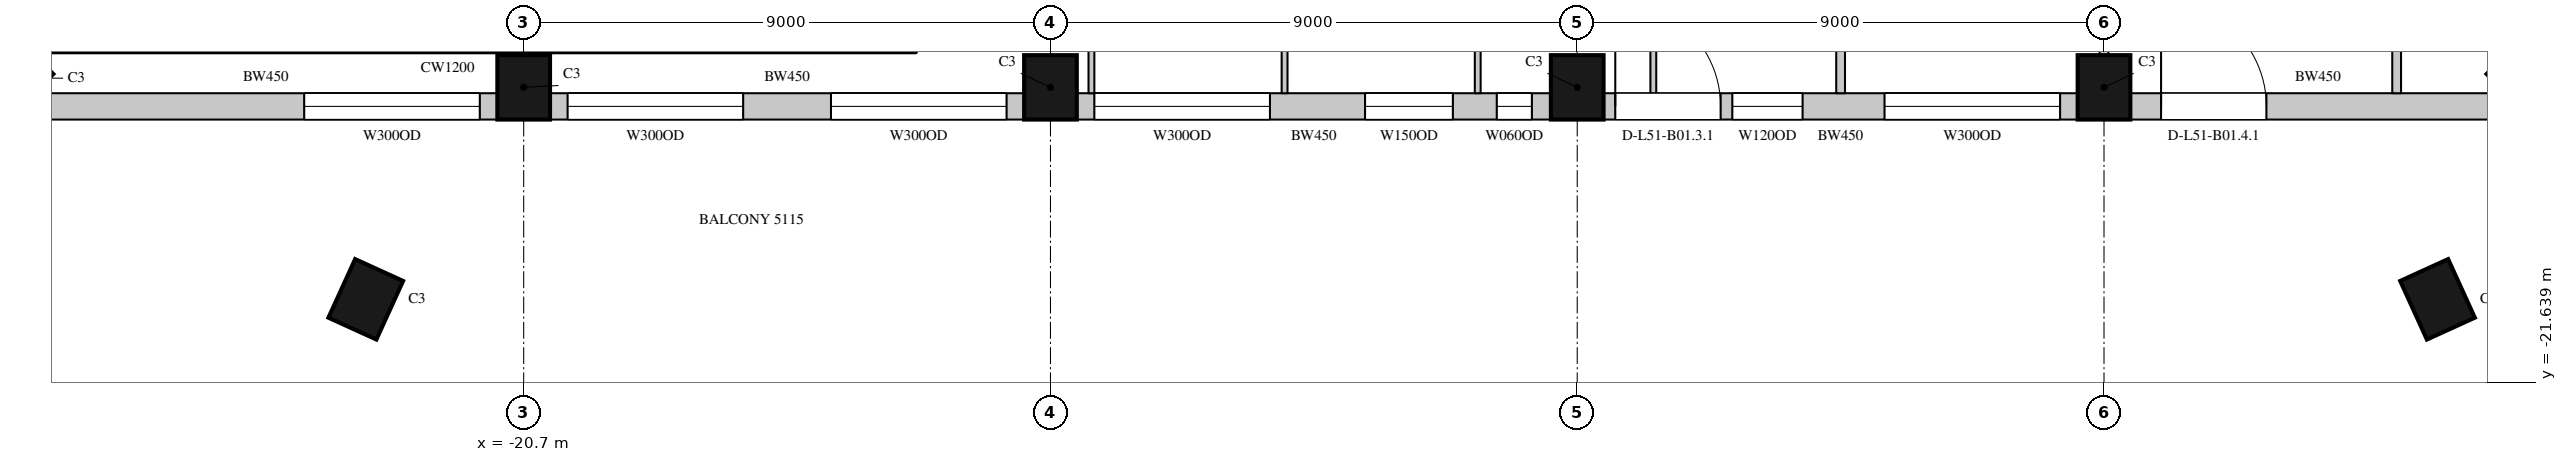
"""IFC4 building model, lengths in metres.
Left out: names, types, materials, properties, quantities, classifications, styles, units other than length and angle.
Written with IfcOpenShell. Run it as: python <this file> out.ifc"""

import sys

from ifc_helpers import new_model, si_unit, direction, frame, frame_2d, origin, origin_2d, place, context, subcontext, project, spatial, rectangle, extrude, element, fill, save


model = new_model("IFC4")
c1 = context("Model", 3, precision=1e-05, world=origin(), true_north=direction((0.0, 1.0)))
c2 = subcontext(c1, "Body", "Model", "MODEL_VIEW")
j1 = project(units=[si_unit("LENGTHUNIT", "METRE"), si_unit("PLANEANGLEUNIT", "RADIAN")], contexts=[c1])
p1 = place(None, origin())
s1 = spatial("IfcSite", under=j1, at=p1, CompositionType="ELEMENT")
p2 = place(p1, origin())
s2 = spatial("IfcBuilding", under=s1, at=p2, CompositionType="ELEMENT")
p3 = place(p2, frame((0.0, 0.0, 230.2)))
s3 = spatial("IfcBuildingStorey", under=s2, at=p3, CompositionType="ELEMENT", Elevation=230.2)
for number, where, z_axis, x_axis in (
    (1, (-29.443, -16.443, 0.0), (0.0, 0.0, 1.0), (0.707, -0.707, 0.0)),
    (2, (-20.7, -16.6, 0.0), (0.0, 0.0, 1.0), (1.0, 0.0, 0.0)),
    (3, (-11.7, -16.6, 0.0), (0.0, 0.0, 1.0), (1.0, 0.0, 0.0)),
    (4, (-2.7, -16.6, 0.0), (0.0, 0.0, 1.0), (1.0, 0.0, 0.0)),
    (5, (6.3, -16.6, 0.0), (0.0, 0.0, 1.0), (1.0, 0.0, 0.0)),
    (6, (13.543, -16.443, 0.0), (0.0, 0.0, 1.0), (0.707, 0.707, 0.0)),
    (7, (-23.398, -20.221, 0.0), (0.0, 0.0, 1.0), (0.91, -0.415, 0.0)),
    (8, (11.998, -20.221, 0.0), (0.0, 0.0, 1.0), (0.91, 0.415, 0.0)),
):
    element("IfcColumn", number, at=place(p3, frame(where, z_axis=z_axis, x_axis=x_axis)), inside=s3, PredefinedType="COLUMN", context=c2, shape_type="SweptSolid", body=[
        extrude(rectangle(XDim=0.9, YDim=1.1, at=origin_2d()), origin(), (0.0, 0.0, 1.0), 4.1),
    ])
p4 = place(p3, frame((-29.064, -16.925, 0.0), z_axis=(0.0, 0.0, 1.0), x_axis=(1.0, 0.0, 0.0)))
e9 = element("IfcWall", 9, at=p4, inside=s3, PredefinedType="SOLIDWALL", context=c2, shape_type="SweptSolid", body=[
    extrude(rectangle(XDim=7.914, YDim=0.45, at=frame_2d((3.957, 0.0))), origin(), (0.0, 0.0, 1.0), 3.8),
])
p5 = place(p4, frame((4.614, 0.0, 1.05)))
e10 = element("IfcOpeningElement", 10, at=p5, cuts=e9, PredefinedType="OPENING", context=c2, shape_type="SweptSolid", body=[
    extrude(rectangle(XDim=3.0, YDim=2.4, at=frame_2d((1.5, 1.2))), frame((0.0, 0.235, 0.0), z_axis=(0.0, -1.0, 0.0), x_axis=(1.0, 0.0, 0.0)), (0.0, 0.0, 1.0), 0.47),
])
p6 = place(p3, frame((-20.25, -16.925, 0.0), z_axis=(0.0, 0.0, 1.0), x_axis=(1.0, 0.0, 0.0)))
e11 = element("IfcWall", 11, at=p6, inside=s3, PredefinedType="SOLIDWALL", context=c2, shape_type="SweptSolid", body=[
    extrude(rectangle(XDim=8.1, YDim=0.45, at=frame_2d((4.05, 0.0))), origin(), (0.0, 0.0, 1.0), 3.8),
])
p7 = place(p6, frame((0.3, 0.0, 1.05)))
e12 = element("IfcOpeningElement", 12, at=p7, cuts=e11, PredefinedType="OPENING", context=c2, shape_type="SweptSolid", body=[
    extrude(rectangle(XDim=3.0, YDim=2.4, at=frame_2d((1.5, 1.2))), frame((0.0, 0.235, 0.0), z_axis=(0.0, -1.0, 0.0), x_axis=(1.0, 0.0, 0.0)), (0.0, 0.0, 1.0), 0.47),
])
p8 = place(p6, frame((4.8, 0.0, 1.05)))
e13 = element("IfcOpeningElement", 13, at=p8, cuts=e11, PredefinedType="OPENING", context=c2, shape_type="SweptSolid", body=[
    extrude(rectangle(XDim=3.0, YDim=2.4, at=frame_2d((1.5, 1.2))), frame((0.0, 0.235, 0.0), z_axis=(0.0, -1.0, 0.0), x_axis=(1.0, 0.0, 0.0)), (0.0, 0.0, 1.0), 0.47),
])
p9 = place(p3, frame((-11.25, -16.925, 0.0), z_axis=(0.0, 0.0, 1.0), x_axis=(1.0, 0.0, 0.0)))
e14 = element("IfcWall", 14, at=p9, inside=s3, PredefinedType="SOLIDWALL", context=c2, shape_type="SweptSolid", body=[
    extrude(rectangle(XDim=8.1, YDim=0.45, at=frame_2d((4.05, 0.0))), origin(), (0.0, 0.0, 1.0), 3.8),
])
p10 = place(p9, frame((0.3, 0.0, 1.05)))
e15 = element("IfcOpeningElement", 15, at=p10, cuts=e14, PredefinedType="OPENING", context=c2, shape_type="SweptSolid", body=[
    extrude(rectangle(XDim=3.0, YDim=2.4, at=frame_2d((1.5, 1.2))), frame((0.0, 0.235, 0.0), z_axis=(0.0, -1.0, 0.0), x_axis=(1.0, 0.0, 0.0)), (0.0, 0.0, 1.0), 0.47),
])
p11 = place(p9, frame((4.925, 0.0, 1.05)))
e16 = element("IfcOpeningElement", 16, at=p11, cuts=e14, PredefinedType="OPENING", context=c2, shape_type="SweptSolid", body=[
    extrude(rectangle(XDim=1.5, YDim=2.4, at=frame_2d((0.75, 1.2))), frame((0.0, 0.235, 0.0), z_axis=(0.0, -1.0, 0.0), x_axis=(1.0, 0.0, 0.0)), (0.0, 0.0, 1.0), 0.47),
])
p12 = place(p9, frame((7.175, 0.0, 1.05)))
e17 = element("IfcOpeningElement", 17, at=p12, cuts=e14, PredefinedType="OPENING", context=c2, shape_type="SweptSolid", body=[
    extrude(rectangle(XDim=0.6, YDim=2.4, at=frame_2d((0.3, 1.2))), frame((0.0, 0.235, 0.0), z_axis=(0.0, -1.0, 0.0), x_axis=(1.0, 0.0, 0.0)), (0.0, 0.0, 1.0), 0.47),
])
p13 = place(p3, frame((-2.25, -16.925, 0.0), z_axis=(0.0, 0.0, 1.0), x_axis=(1.0, 0.0, 0.0)))
e18 = element("IfcWall", 18, at=p13, inside=s3, PredefinedType="SOLIDWALL", context=c2, shape_type="SweptSolid", body=[
    extrude(rectangle(XDim=8.1, YDim=0.45, at=frame_2d((4.05, 0.0))), origin(), (0.0, 0.0, 1.0), 3.8),
])
p14 = place(p13, frame((0.2, 0.0, 0.0)))
e19 = element("IfcOpeningElement", 19, at=p14, cuts=e18, PredefinedType="OPENING", context=c2, shape_type="SweptSolid", body=[
    extrude(rectangle(XDim=1.8, YDim=2.4, at=frame_2d((0.9, 1.2))), frame((0.0, 0.235, 0.0), z_axis=(0.0, -1.0, 0.0), x_axis=(1.0, 0.0, 0.0)), (0.0, 0.0, 1.0), 0.47),
])
p15 = place(p13, frame((2.2, 0.0, 1.05)))
e20 = element("IfcOpeningElement", 20, at=p15, cuts=e18, PredefinedType="OPENING", context=c2, shape_type="SweptSolid", body=[
    extrude(rectangle(XDim=1.2, YDim=2.4, at=frame_2d((0.6, 1.2))), frame((0.0, 0.235, 0.0), z_axis=(0.0, -1.0, 0.0), x_axis=(1.0, 0.0, 0.0)), (0.0, 0.0, 1.0), 0.47),
])
p16 = place(p13, frame((4.8, 0.0, 1.05)))
e21 = element("IfcOpeningElement", 21, at=p16, cuts=e18, PredefinedType="OPENING", context=c2, shape_type="SweptSolid", body=[
    extrude(rectangle(XDim=3.0, YDim=2.4, at=frame_2d((1.5, 1.2))), frame((0.0, 0.235, 0.0), z_axis=(0.0, -1.0, 0.0), x_axis=(1.0, 0.0, 0.0)), (0.0, 0.0, 1.0), 0.47),
])
p17 = place(p3, frame((6.75, -16.925, 0.0), z_axis=(0.0, 0.0, 1.0), x_axis=(1.0, 0.0, 0.0)))
e22 = element("IfcWall", 22, at=p17, inside=s3, PredefinedType="SOLIDWALL", context=c2, shape_type="SweptSolid", body=[
    extrude(rectangle(XDim=6.414, YDim=0.45, at=frame_2d((3.207, 0.0))), origin(), (0.0, 0.0, 1.0), 3.8),
])
p18 = place(p17, frame((0.525, 0.0, 0.0)))
e23 = element("IfcOpeningElement", 23, at=p18, cuts=e22, PredefinedType="OPENING", context=c2, shape_type="SweptSolid", body=[
    extrude(rectangle(XDim=1.8, YDim=2.4, at=frame_2d((0.9, 1.2))), frame((0.0, 0.235, 0.0), z_axis=(0.0, -1.0, 0.0), x_axis=(1.0, 0.0, 0.0)), (0.0, 0.0, 1.0), 0.47),
])
for number, where, z_axis, x_axis in (
    (24, (-23.69, -18.0, 0.0), (0.0, 0.0, 1.0), (1.0, 0.0, 0.0)),
    (25, (-19.73, -18.0, 0.0), (0.0, 0.0, 1.0), (1.0, 0.0, 0.0)),
    (26, (-15.77, -18.0, 0.0), (0.0, 0.0, 1.0), (1.0, 0.0, 0.0)),
    (27, (-11.81, -18.0, 0.0), (0.0, 0.0, 1.0), (1.0, 0.0, 0.0)),
):
    element("IfcWall", number, at=place(p3, frame(where, z_axis=z_axis, x_axis=x_axis)), inside=s3, PredefinedType="SOLIDWALL", context=c2, shape_type="SweptSolid", body=[
        extrude(rectangle(XDim=3.76, YDim=0.45, at=frame_2d((1.88, 0.0))), origin(), (0.0, 0.0, 1.0), 0.6),
    ])
p19 = place(p3, frame((-6.85, -18.0, 0.0), z_axis=(0.0, 0.0, 1.0), x_axis=(1.0, 0.0, 0.0)))
e28 = element("IfcWall", 28, at=p19, inside=s3, PredefinedType="SOLIDWALL", context=c2, shape_type="SweptSolid", body=[
    extrude(rectangle(XDim=1.76, YDim=0.45, at=frame_2d((0.88, 0.0))), origin(), (0.0, 0.0, 1.0), 0.6),
])
p20 = place(p3, frame((-3.89, -18.0, 0.0), z_axis=(0.0, 0.0, 1.0), x_axis=(1.0, 0.0, 0.0)))
e29 = element("IfcWall", 29, at=p20, inside=s3, PredefinedType="SOLIDWALL", context=c2, shape_type="SweptSolid", body=[
    extrude(rectangle(XDim=1.54, YDim=0.45, at=frame_2d((0.77, 0.0))), origin(), (0.0, 0.0, 1.0), 0.6),
])
p21 = place(p3, frame((0.07, -18.0, 0.0), z_axis=(0.0, 0.0, 1.0), x_axis=(1.0, 0.0, 0.0)))
e30 = element("IfcWall", 30, at=p21, inside=s3, PredefinedType="SOLIDWALL", context=c2, shape_type="SweptSolid", body=[
    extrude(rectangle(XDim=3.76, YDim=0.45, at=frame_2d((1.88, 0.0))), origin(), (0.0, 0.0, 1.0), 0.6),
])
p22 = place(p3, frame((4.03, -18.0, 0.0), z_axis=(0.0, 0.0, 1.0), x_axis=(1.0, 0.0, 0.0)))
e31 = element("IfcWall", 31, at=p22, inside=s3, PredefinedType="SOLIDWALL", context=c2, shape_type="SweptSolid", body=[
    extrude(rectangle(XDim=2.945, YDim=0.45, at=frame_2d((1.473, 0.0))), origin(), (0.0, 0.0, 1.0), 0.6),
])
p23 = place(p3, frame((1.8, -16.7, 0.0), z_axis=(0.0, 0.0, 1.0), x_axis=(0.0, 1.0, 0.0)))
e32 = element("IfcWall", 32, at=p23, inside=s3, PredefinedType="PARTITIONING", context=c2, shape_type="SweptSolid", body=[
    extrude(rectangle(XDim=4.3, YDim=0.15, at=frame_2d((2.15, 0.0))), origin(), (0.0, 0.0, 1.0), 3.15),
])
p24 = place(p3, frame((6.3, -16.05, 0.0), z_axis=(0.0, 0.0, 1.0), x_axis=(0.0, 1.0, 0.0)))
e33 = element("IfcWall", 33, at=p24, inside=s3, PredefinedType="PARTITIONING", context=c2, shape_type="SweptSolid", body=[
    extrude(rectangle(XDim=3.65, YDim=0.15, at=frame_2d((1.825, 0.0))), origin(), (0.0, 0.0, 1.0), 3.25),
])
p25 = place(p3, frame((11.3, -16.7, 0.0), z_axis=(0.0, 0.0, 1.0), x_axis=(0.0, 1.0, 0.0)))
e34 = element("IfcWall", 34, at=p25, inside=s3, PredefinedType="PARTITIONING", context=c2, shape_type="SweptSolid", body=[
    extrude(rectangle(XDim=4.4, YDim=0.15, at=frame_2d((2.2, 0.0))), origin(), (0.0, 0.0, 1.0), 3.8),
])
p26 = place(p3, frame((-11.0, -16.7, 0.0), z_axis=(0.0, 0.0, 1.0), x_axis=(0.0, 1.0, 0.0)))
e35 = element("IfcWall", 35, at=p26, inside=s3, PredefinedType="PARTITIONING", context=c2, shape_type="SweptSolid", body=[
    extrude(rectangle(XDim=1.88, YDim=0.1, at=frame_2d((0.94, 0.0))), origin(), (0.0, 0.0, 1.0), 3.8),
])
for number, where, z_axis, x_axis in (
    (36, (-7.7, -16.7, 0.0), (0.0, 0.0, 1.0), (0.0, 1.0, 0.0)),
    (37, (-4.4, -16.7, 0.0), (0.0, 0.0, 1.0), (0.0, 1.0, 0.0)),
    (38, (-1.4, -16.7, 0.0), (0.0, 0.0, 1.0), (0.0, 1.0, 0.0)),
):
    element("IfcWall", number, at=place(p3, frame(where, z_axis=z_axis, x_axis=x_axis)), inside=s3, PredefinedType="PARTITIONING", context=c2, shape_type="SweptSolid", body=[
        extrude(rectangle(XDim=4.3, YDim=0.1, at=frame_2d((2.15, 0.0))), origin(), (0.0, 0.0, 1.0), 3.8),
    ])
p27 = place(p5, origin())
e39 = element("IfcWindow", 39, at=p27, inside=s3, PartitioningType="SINGLE_PANEL", PredefinedType="WINDOW", context=c2, shape_type="SweptSolid", body=[
    extrude(rectangle(XDim=3.0, YDim=2.4, at=frame_2d((1.5, 1.2))), frame((0.0, 0.135, 0.0), z_axis=(0.0, -1.0, 0.0), x_axis=(1.0, 0.0, 0.0)), (0.0, 0.0, 1.0), 0.06),
])
fill(e10, e39)
p28 = place(p7, origin())
e40 = element("IfcWindow", 40, at=p28, inside=s3, PartitioningType="SINGLE_PANEL", PredefinedType="WINDOW", context=c2, shape_type="SweptSolid", body=[
    extrude(rectangle(XDim=3.0, YDim=2.4, at=frame_2d((1.5, 1.2))), frame((0.0, 0.135, 0.0), z_axis=(0.0, -1.0, 0.0), x_axis=(1.0, 0.0, 0.0)), (0.0, 0.0, 1.0), 0.06),
])
fill(e12, e40)
p29 = place(p8, origin())
e41 = element("IfcWindow", 41, at=p29, inside=s3, PartitioningType="SINGLE_PANEL", PredefinedType="WINDOW", context=c2, shape_type="SweptSolid", body=[
    extrude(rectangle(XDim=3.0, YDim=2.4, at=frame_2d((1.5, 1.2))), frame((0.0, 0.135, 0.0), z_axis=(0.0, -1.0, 0.0), x_axis=(1.0, 0.0, 0.0)), (0.0, 0.0, 1.0), 0.06),
])
fill(e13, e41)
p30 = place(p10, origin())
e42 = element("IfcWindow", 42, at=p30, inside=s3, PartitioningType="SINGLE_PANEL", PredefinedType="WINDOW", context=c2, shape_type="SweptSolid", body=[
    extrude(rectangle(XDim=3.0, YDim=2.4, at=frame_2d((1.5, 1.2))), frame((0.0, 0.135, 0.0), z_axis=(0.0, -1.0, 0.0), x_axis=(1.0, 0.0, 0.0)), (0.0, 0.0, 1.0), 0.06),
])
fill(e15, e42)
p31 = place(p14, origin())
e43 = element("IfcDoor", 43, at=p31, inside=s3, OperationType="SLIDING_TO_LEFT", PredefinedType="DOOR", context=c2, shape_type="SweptSolid", body=[
    extrude(rectangle(XDim=1.8, YDim=2.4, at=frame_2d((0.9, 1.2))), frame((0.0, 0.13, 0.0), z_axis=(0.0, -1.0, 0.0), x_axis=(1.0, 0.0, 0.0)), (0.0, 0.0, 1.0), 0.05),
])
fill(e19, e43)
p32 = place(p15, origin())
e44 = element("IfcWindow", 44, at=p32, inside=s3, PartitioningType="SINGLE_PANEL", PredefinedType="WINDOW", context=c2, shape_type="SweptSolid", body=[
    extrude(rectangle(XDim=1.2, YDim=2.4, at=frame_2d((0.6, 1.2))), frame((0.0, 0.135, 0.0), z_axis=(0.0, -1.0, 0.0), x_axis=(1.0, 0.0, 0.0)), (0.0, 0.0, 1.0), 0.06),
])
fill(e20, e44)
p33 = place(p16, origin())
e45 = element("IfcWindow", 45, at=p33, inside=s3, PartitioningType="SINGLE_PANEL", PredefinedType="WINDOW", context=c2, shape_type="SweptSolid", body=[
    extrude(rectangle(XDim=3.0, YDim=2.4, at=frame_2d((1.5, 1.2))), frame((0.0, 0.135, 0.0), z_axis=(0.0, -1.0, 0.0), x_axis=(1.0, 0.0, 0.0)), (0.0, 0.0, 1.0), 0.06),
])
fill(e21, e45)
p34 = place(p18, origin())
e46 = element("IfcDoor", 46, at=p34, inside=s3, OperationType="SLIDING_TO_LEFT", PredefinedType="DOOR", context=c2, shape_type="SweptSolid", body=[
    extrude(rectangle(XDim=1.8, YDim=2.4, at=frame_2d((0.9, 1.2))), frame((0.0, 0.13, 0.0), z_axis=(0.0, -1.0, 0.0), x_axis=(1.0, 0.0, 0.0)), (0.0, 0.0, 1.0), 0.05),
])
fill(e23, e46)
p35 = place(p11, origin())
e47 = element("IfcWindow", 47, at=p35, inside=s3, PartitioningType="SINGLE_PANEL", PredefinedType="WINDOW", context=c2, shape_type="SweptSolid", body=[
    extrude(rectangle(XDim=1.5, YDim=2.4, at=frame_2d((0.75, 1.2))), frame((0.0, 0.135, 0.0), z_axis=(0.0, -1.0, 0.0), x_axis=(1.0, 0.0, 0.0)), (0.0, 0.0, 1.0), 0.06),
])
fill(e16, e47)
p36 = place(p12, origin())
e48 = element("IfcWindow", 48, at=p36, inside=s3, PartitioningType="SINGLE_PANEL", PredefinedType="WINDOW", context=c2, shape_type="SweptSolid", body=[
    extrude(rectangle(XDim=0.6, YDim=2.4, at=frame_2d((0.3, 1.2))), frame((0.0, 0.135, 0.0), z_axis=(0.0, -1.0, 0.0), x_axis=(1.0, 0.0, 0.0)), (0.0, 0.0, 1.0), 0.06),
])
fill(e17, e48)
save(model, sys.argv[1])
